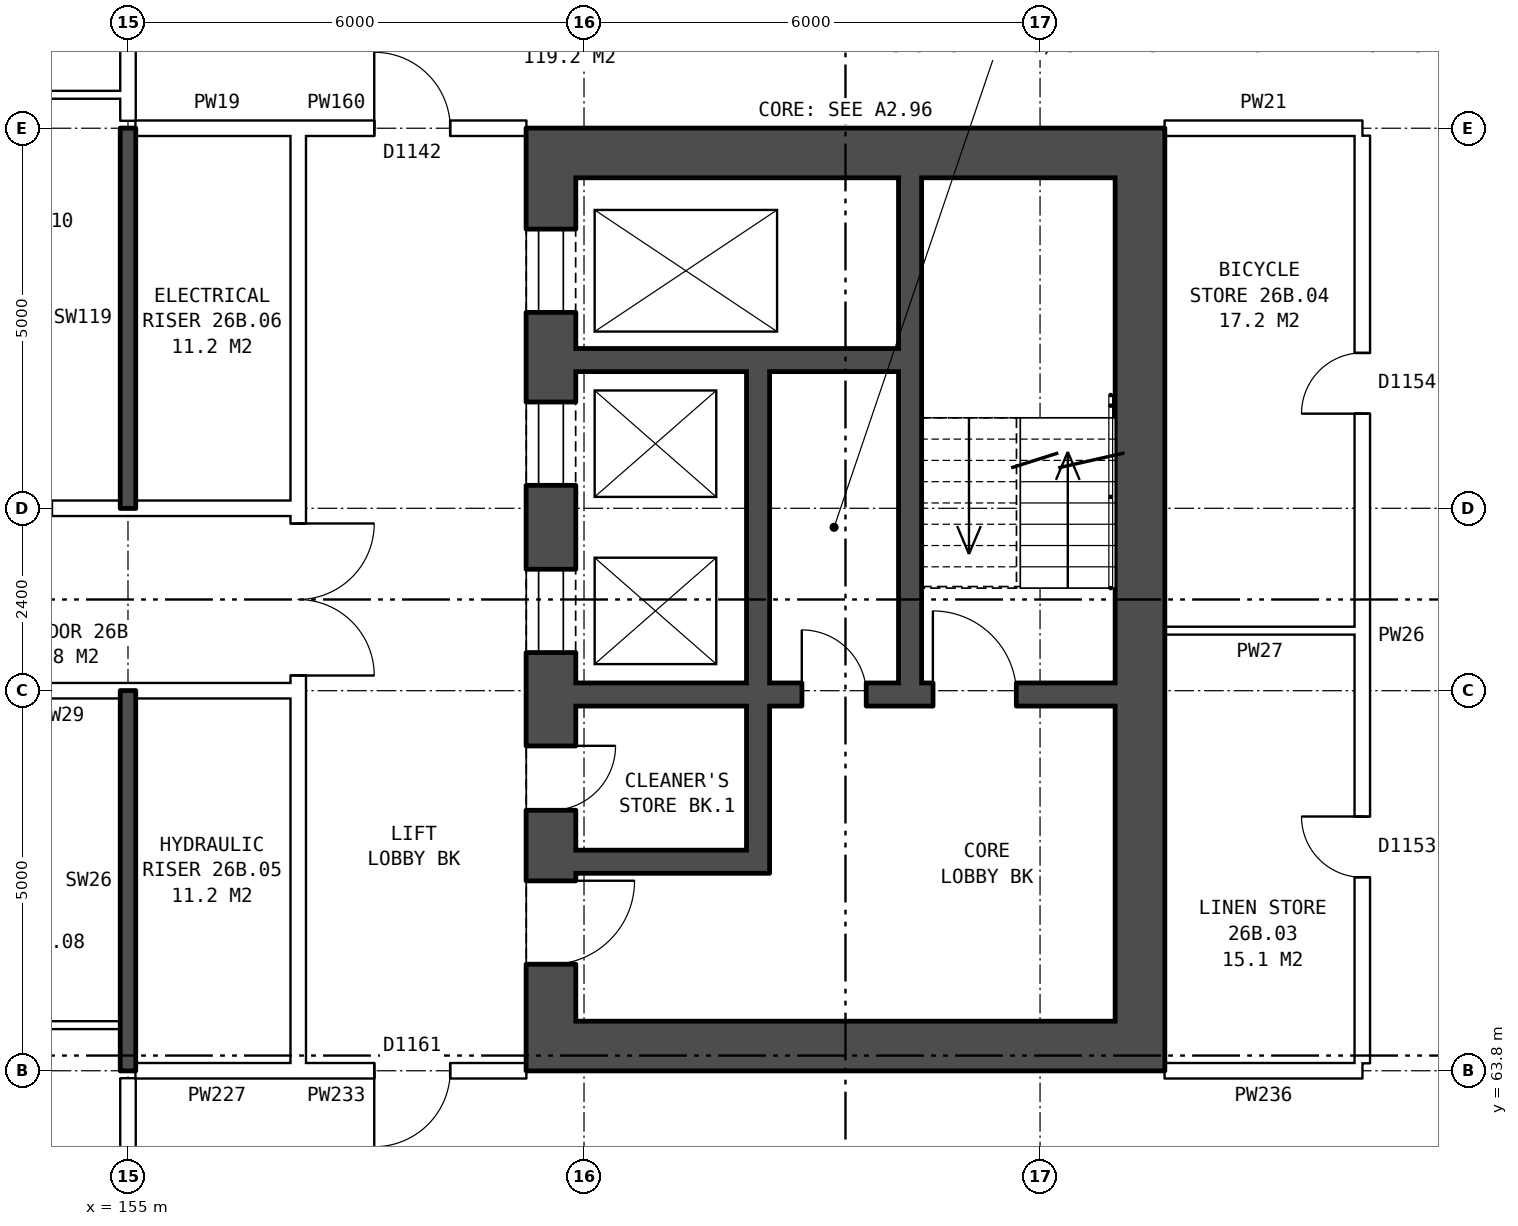
"""IFC4 building model, lengths in metres.
Left out: names, types, materials, properties, quantities, classifications, styles, units other than length and angle.
Written with IfcOpenShell. Run it as: python <this file> out.ifc"""

import sys

from ifc_helpers import new_model, si_unit, direction, frame, frame_2d, origin, place, context, subcontext, project, spatial, rectangle, extrude, element, fill, save


model = new_model("IFC4")
c1 = context("Model", 3, precision=1e-05, world=origin(), true_north=direction((0.0, 1.0)))
c2 = subcontext(c1, "Body", "Model", "MODEL_VIEW")
j1 = project(units=[si_unit("LENGTHUNIT", "METRE"), si_unit("PLANEANGLEUNIT", "RADIAN")], contexts=[c1])
p1 = place(None, origin())
s1 = spatial("IfcSite", under=j1, at=p1, CompositionType="ELEMENT")
p2 = place(p1, origin())
s2 = spatial("IfcBuilding", under=s1, at=p2, CompositionType="ELEMENT")
p3 = place(p2, frame((0.0, 0.0, 96.4)))
s3 = spatial("IfcBuildingStorey", under=s2, at=p3, CompositionType="ELEMENT", Elevation=96.4)
p4 = place(p3, frame((160.565, 75.55, 0.0), z_axis=(0.0, 0.0, 1.0), x_axis=(0.0, -1.0, 0.0)))
e1 = element("IfcWall", 1, at=p4, inside=s3, PredefinedType="SHEAR", context=c2, shape_type="SweptSolid", body=[
    extrude(rectangle(XDim=11.1, YDim=0.65, at=frame_2d((5.55, 0.0))), origin(), (0.0, 0.0, 1.0), 2.85),
])
p5 = place(p4, frame((0.675, 0.0, 0.0)))
e2 = element("IfcOpeningElement", 2, at=p5, cuts=e1, PredefinedType="OPENING", context=c2, shape_type="SweptSolid", body=[
    extrude(rectangle(XDim=1.1, YDim=2.1, at=frame_2d((0.55, 1.05))), frame((0.0, 0.335, 0.0), z_axis=(0.0, -1.0, 0.0), x_axis=(1.0, 0.0, 0.0)), (0.0, 0.0, 1.0), 0.67),
])
p6 = place(p4, frame((2.95, 0.0, 0.0)))
e3 = element("IfcOpeningElement", 3, at=p6, cuts=e1, PredefinedType="OPENING", context=c2, shape_type="SweptSolid", body=[
    extrude(rectangle(XDim=1.1, YDim=2.1, at=frame_2d((0.55, 1.05))), frame((0.0, 0.335, 0.0), z_axis=(0.0, -1.0, 0.0), x_axis=(1.0, 0.0, 0.0)), (0.0, 0.0, 1.0), 0.67),
])
p7 = place(p4, frame((5.15, 0.0, 0.0)))
e4 = element("IfcOpeningElement", 4, at=p7, cuts=e1, PredefinedType="OPENING", context=c2, shape_type="SweptSolid", body=[
    extrude(rectangle(XDim=1.1, YDim=2.1, at=frame_2d((0.55, 1.05))), frame((0.0, 0.335, 0.0), z_axis=(0.0, -1.0, 0.0), x_axis=(1.0, 0.0, 0.0)), (0.0, 0.0, 1.0), 0.67),
])
p8 = place(p4, frame((9.25, 0.0, 0.0)))
e5 = element("IfcOpeningElement", 5, at=p8, cuts=e1, PredefinedType="OPENING", context=c2, shape_type="SweptSolid", body=[
    extrude(rectangle(XDim=1.1, YDim=2.1, at=frame_2d((0.55, 1.05))), frame((0.0, 0.335, 0.0), z_axis=(0.0, -1.0, 0.0), x_axis=(1.0, 0.0, 0.0)), (0.0, 0.0, 1.0), 0.67),
])
p9 = place(p4, frame((7.475, 0.0, 0.0)))
e6 = element("IfcOpeningElement", 6, at=p9, cuts=e1, PredefinedType="OPENING", context=c2, shape_type="SweptSolid", body=[
    extrude(rectangle(XDim=0.85, YDim=2.1, at=frame_2d((0.425, 1.05))), frame((0.0, 0.335, 0.0), z_axis=(0.0, -1.0, 0.0), x_axis=(1.0, 0.0, 0.0)), (0.0, 0.0, 1.0), 0.67),
])
p10 = place(p3, frame((168.315, 75.55, 0.0), z_axis=(0.0, 0.0, 1.0), x_axis=(0.0, -1.0, 0.0)))
e7 = element("IfcWall", 7, at=p10, inside=s3, PredefinedType="SHEAR", context=c2, shape_type="SweptSolid", body=[
    extrude(rectangle(XDim=11.1, YDim=0.65, at=frame_2d((5.55, 0.0))), origin(), (0.0, 0.0, 1.0), 2.85),
])
for number, where, z_axis, x_axis in (
    (8, (160.24, 75.875, 0.0), (0.0, 0.0, 1.0), (1.0, 0.0, 0.0)),
    (9, (160.24, 64.125, 0.0), (0.0, 0.0, 1.0), (1.0, 0.0, 0.0)),
):
    element("IfcWall", number, at=place(p3, frame(where, z_axis=z_axis, x_axis=x_axis)), inside=s3, PredefinedType="SHEAR", context=c2, shape_type="SweptSolid", body=[
        extrude(rectangle(XDim=8.4, YDim=0.65, at=frame_2d((4.2, 0.0))), origin(), (0.0, 0.0, 1.0), 2.85),
    ])
p11 = place(p3, frame((160.89, 73.15, 0.0), z_axis=(0.0, 0.0, 1.0), x_axis=(1.0, 0.0, 0.0)))
e10 = element("IfcWall", 10, at=p11, inside=s3, PredefinedType="SHEAR", context=c2, shape_type="SweptSolid", body=[
    extrude(rectangle(XDim=4.25, YDim=0.3, at=frame_2d((2.125, 0.0))), origin(), (0.0, 0.0, 1.0), 2.85),
])
p12 = place(p3, frame((160.89, 68.75, 0.0), z_axis=(0.0, 0.0, 1.0), x_axis=(1.0, 0.0, 0.0)))
e11 = element("IfcWall", 11, at=p12, inside=s3, PredefinedType="SHEAR", context=c2, shape_type="SweptSolid", body=[
    extrude(rectangle(XDim=7.1, YDim=0.3, at=frame_2d((3.55, 0.0))), origin(), (0.0, 0.0, 1.0), 2.85),
])
p13 = place(p12, frame((4.7, 0.0, 0.0)))
e12 = element("IfcOpeningElement", 12, at=p13, cuts=e11, PredefinedType="OPENING", context=c2, shape_type="SweptSolid", body=[
    extrude(rectangle(XDim=1.1, YDim=2.1, at=frame_2d((0.55, 1.05))), frame((0.0, 0.16, 0.0), z_axis=(0.0, -1.0, 0.0), x_axis=(1.0, 0.0, 0.0)), (0.0, 0.0, 1.0), 0.32),
])
p14 = place(p12, frame((2.975, 0.0, 0.0)))
e13 = element("IfcOpeningElement", 13, at=p14, cuts=e11, PredefinedType="OPENING", context=c2, shape_type="SweptSolid", body=[
    extrude(rectangle(XDim=0.85, YDim=2.1, at=frame_2d((0.425, 1.05))), frame((0.0, 0.16, 0.0), z_axis=(0.0, -1.0, 0.0), x_axis=(1.0, 0.0, 0.0)), (0.0, 0.0, 1.0), 0.32),
])
p15 = place(p3, frame((160.89, 66.55, 0.0), z_axis=(0.0, 0.0, 1.0), x_axis=(1.0, 0.0, 0.0)))
e14 = element("IfcWall", 14, at=p15, inside=s3, PredefinedType="SHEAR", context=c2, shape_type="SweptSolid", body=[
    extrude(rectangle(XDim=2.25, YDim=0.3, at=frame_2d((1.125, 0.0))), origin(), (0.0, 0.0, 1.0), 2.85),
])
p16 = place(p3, frame((163.29, 73.0, 0.0), z_axis=(0.0, 0.0, 1.0), x_axis=(0.0, -1.0, 0.0)))
e15 = element("IfcWall", 15, at=p16, inside=s3, PredefinedType="SHEAR", context=c2, shape_type="SweptSolid", body=[
    extrude(rectangle(XDim=4.1, YDim=0.3, at=frame_2d((2.05, 0.0))), origin(), (0.0, 0.0, 1.0), 2.85),
])
p17 = place(p3, frame((163.29, 68.6, 0.0), z_axis=(0.0, 0.0, 1.0), x_axis=(0.0, -1.0, 0.0)))
e16 = element("IfcWall", 16, at=p17, inside=s3, PredefinedType="SHEAR", context=c2, shape_type="SweptSolid", body=[
    extrude(rectangle(XDim=2.2, YDim=0.3, at=frame_2d((1.1, 0.0))), origin(), (0.0, 0.0, 1.0), 2.85),
])
p18 = place(p3, frame((165.29, 75.55, 0.0), z_axis=(0.0, 0.0, 1.0), x_axis=(0.0, -1.0, 0.0)))
e17 = element("IfcWall", 17, at=p18, inside=s3, PredefinedType="SHEAR", context=c2, shape_type="SweptSolid", body=[
    extrude(rectangle(XDim=6.65, YDim=0.3, at=frame_2d((3.325, 0.0))), origin(), (0.0, 0.0, 1.0), 2.85),
])
p19 = place(p3, frame((157.24, 63.9, 0.0), z_axis=(0.0, 0.0, 1.0), x_axis=(0.0, 1.0, 0.0)))
e18 = element("IfcWall", 18, at=p19, inside=s3, PredefinedType="PARTITIONING", context=c2, shape_type="SweptSolid", body=[
    extrude(rectangle(XDim=12.2, YDim=0.2, at=frame_2d((6.1, 0.0))), origin(), (0.0, 0.0, 1.0), 2.85),
])
p20 = place(p19, frame((5.1, 0.0, 0.0)))
e19 = element("IfcOpeningElement", 19, at=p20, cuts=e18, PredefinedType="OPENING", context=c2, shape_type="SweptSolid", body=[
    extrude(rectangle(XDim=2.0, YDim=2.1, at=frame_2d((1.0, 1.05))), frame((0.0, 0.11, 0.0), z_axis=(0.0, -1.0, 0.0), x_axis=(1.0, 0.0, 0.0)), (0.0, 0.0, 1.0), 0.22),
])
p21 = place(p3, frame((155.1, 63.8, 0.0), z_axis=(0.0, 0.0, 1.0), x_axis=(1.0, 0.0, 0.0)))
e20 = element("IfcWall", 20, at=p21, inside=s3, PredefinedType="PARTITIONING", context=c2, shape_type="SweptSolid", body=[
    extrude(rectangle(XDim=2.14, YDim=0.2, at=frame_2d((1.07, 0.0))), origin(), (0.0, 0.0, 1.0), 2.85),
])
p22 = place(p3, frame((157.24, 63.8, 0.0), z_axis=(0.0, 0.0, 1.0), x_axis=(1.0, 0.0, 0.0)))
e21 = element("IfcWall", 21, at=p22, inside=s3, PredefinedType="PARTITIONING", context=c2, shape_type="SweptSolid", body=[
    extrude(rectangle(XDim=3.0, YDim=0.2, at=frame_2d((1.5, 0.0))), origin(), (0.0, 0.0, 1.0), 2.85),
])
p23 = place(p22, frame((1.0, 0.0, 0.0)))
e22 = element("IfcOpeningElement", 22, at=p23, cuts=e21, PredefinedType="OPENING", context=c2, shape_type="SweptSolid", body=[
    extrude(rectangle(XDim=1.0, YDim=2.1, at=frame_2d((0.5, 1.05))), frame((0.0, 0.11, 0.0), z_axis=(0.0, -1.0, 0.0), x_axis=(1.0, 0.0, 0.0)), (0.0, 0.0, 1.0), 0.22),
])
p24 = place(p3, frame((168.64, 63.8, 0.0), z_axis=(0.0, 0.0, 1.0), x_axis=(1.0, 0.0, 0.0)))
e23 = element("IfcWall", 23, at=p24, inside=s3, PredefinedType="PARTITIONING", context=c2, shape_type="SweptSolid", body=[
    extrude(rectangle(XDim=2.6, YDim=0.2, at=frame_2d((1.3, 0.0))), origin(), (0.0, 0.0, 1.0), 2.85),
])
p25 = place(p3, frame((152.0, 64.4, 0.0), z_axis=(0.0, 0.0, 1.0), x_axis=(1.0, 0.0, 0.0)))
e24 = element("IfcWall", 24, at=p25, inside=s3, PredefinedType="PARTITIONING", context=c2, shape_type="SweptSolid", body=[
    extrude(rectangle(XDim=2.9, YDim=0.1, at=frame_2d((1.45, 0.0))), origin(), (0.0, 0.0, 1.0), 2.85),
])
p26 = place(p3, frame((142.76, 68.8, 0.0), z_axis=(0.0, 0.0, 1.0), x_axis=(1.0, 0.0, 0.0)))
e25 = element("IfcWall", 25, at=p26, inside=s3, PredefinedType="PARTITIONING", context=c2, shape_type="SweptSolid", body=[
    extrude(rectangle(XDim=14.48, YDim=0.2, at=frame_2d((7.24, 0.0))), origin(), (0.0, 0.0, 1.0), 2.85),
])
p27 = place(p26, frame((4.24, 0.0, 0.0)))
e26 = element("IfcOpeningElement", 26, at=p27, cuts=e25, PredefinedType="OPENING", context=c2, shape_type="SweptSolid", body=[
    extrude(rectangle(XDim=1.0, YDim=2.1, at=frame_2d((0.5, 1.05))), frame((0.0, 0.11, 0.0), z_axis=(0.0, -1.0, 0.0), x_axis=(1.0, 0.0, 0.0)), (0.0, 0.0, 1.0), 0.22),
])
p28 = place(p26, frame((7.24, 0.0, 0.0)))
e27 = element("IfcOpeningElement", 27, at=p28, cuts=e25, PredefinedType="OPENING", context=c2, shape_type="SweptSolid", body=[
    extrude(rectangle(XDim=1.0, YDim=2.1, at=frame_2d((0.5, 1.05))), frame((0.0, 0.11, 0.0), z_axis=(0.0, -1.0, 0.0), x_axis=(1.0, 0.0, 0.0)), (0.0, 0.0, 1.0), 0.22),
])
p29 = place(p3, frame((168.64, 69.59, 0.0), z_axis=(0.0, 0.0, 1.0), x_axis=(1.0, 0.0, 0.0)))
e28 = element("IfcWall", 28, at=p29, inside=s3, PredefinedType="PARTITIONING", context=c2, shape_type="SweptSolid", body=[
    extrude(rectangle(XDim=2.5, YDim=0.1, at=frame_2d((1.25, 0.0))), origin(), (0.0, 0.0, 1.0), 2.85),
])
p30 = place(p3, frame((142.76, 71.2, 0.0), z_axis=(0.0, 0.0, 1.0), x_axis=(1.0, 0.0, 0.0)))
e29 = element("IfcWall", 29, at=p30, inside=s3, PredefinedType="PARTITIONING", context=c2, shape_type="SweptSolid", body=[
    extrude(rectangle(XDim=14.48, YDim=0.2, at=frame_2d((7.24, 0.0))), origin(), (0.0, 0.0, 1.0), 2.85),
])
p31 = place(p30, frame((1.12, 0.0, 0.0)))
e30 = element("IfcOpeningElement", 30, at=p31, cuts=e29, PredefinedType="OPENING", context=c2, shape_type="SweptSolid", body=[
    extrude(rectangle(XDim=1.0, YDim=2.1, at=frame_2d((0.5, 1.05))), frame((0.0, 0.11, 0.0), z_axis=(0.0, -1.0, 0.0), x_axis=(1.0, 0.0, 0.0)), (0.0, 0.0, 1.0), 0.22),
])
p32 = place(p30, frame((10.24, 0.0, 0.0)))
e31 = element("IfcOpeningElement", 31, at=p32, cuts=e29, PredefinedType="OPENING", context=c2, shape_type="SweptSolid", body=[
    extrude(rectangle(XDim=1.0, YDim=2.1, at=frame_2d((0.5, 1.05))), frame((0.0, 0.11, 0.0), z_axis=(0.0, -1.0, 0.0), x_axis=(1.0, 0.0, 0.0)), (0.0, 0.0, 1.0), 0.22),
])
p33 = place(p3, frame((155.1, 76.2, 0.0), z_axis=(0.0, 0.0, 1.0), x_axis=(1.0, 0.0, 0.0)))
e32 = element("IfcWall", 32, at=p33, inside=s3, PredefinedType="PARTITIONING", context=c2, shape_type="SweptSolid", body=[
    extrude(rectangle(XDim=2.14, YDim=0.2, at=frame_2d((1.07, 0.0))), origin(), (0.0, 0.0, 1.0), 2.85),
])
p34 = place(p3, frame((157.24, 76.2, 0.0), z_axis=(0.0, 0.0, 1.0), x_axis=(1.0, 0.0, 0.0)))
e33 = element("IfcWall", 33, at=p34, inside=s3, PredefinedType="PARTITIONING", context=c2, shape_type="SweptSolid", body=[
    extrude(rectangle(XDim=3.0, YDim=0.2, at=frame_2d((1.5, 0.0))), origin(), (0.0, 0.0, 1.0), 2.85),
])
p35 = place(p34, frame((1.0, 0.0, 0.0)))
e34 = element("IfcOpeningElement", 34, at=p35, cuts=e33, PredefinedType="OPENING", context=c2, shape_type="SweptSolid", body=[
    extrude(rectangle(XDim=1.0, YDim=2.1, at=frame_2d((0.5, 1.05))), frame((0.0, 0.11, 0.0), z_axis=(0.0, -1.0, 0.0), x_axis=(1.0, 0.0, 0.0)), (0.0, 0.0, 1.0), 0.22),
])
p36 = place(p3, frame((168.64, 76.2, 0.0), z_axis=(0.0, 0.0, 1.0), x_axis=(1.0, 0.0, 0.0)))
e35 = element("IfcWall", 35, at=p36, inside=s3, PredefinedType="PARTITIONING", context=c2, shape_type="SweptSolid", body=[
    extrude(rectangle(XDim=2.6, YDim=0.2, at=frame_2d((1.3, 0.0))), origin(), (0.0, 0.0, 1.0), 2.85),
])
p37 = place(p3, frame((152.0, 76.64, 0.0), z_axis=(0.0, 0.0, 1.0), x_axis=(1.0, 0.0, 0.0)))
e36 = element("IfcWall", 36, at=p37, inside=s3, PredefinedType="PARTITIONING", context=c2, shape_type="SweptSolid", body=[
    extrude(rectangle(XDim=2.9, YDim=0.1, at=frame_2d((1.45, 0.0))), origin(), (0.0, 0.0, 1.0), 2.85),
])
p38 = place(p37, frame((1.0, 0.0, 0.0)))
e37 = element("IfcOpeningElement", 37, at=p38, cuts=e36, PredefinedType="OPENING", context=c2, shape_type="SweptSolid", body=[
    extrude(rectangle(XDim=0.9, YDim=2.1, at=frame_2d((0.45, 1.05))), frame((0.0, 0.06, 0.0), z_axis=(0.0, -1.0, 0.0), x_axis=(1.0, 0.0, 0.0)), (0.0, 0.0, 1.0), 0.12),
])
p39 = place(p3, frame((155.0, 61.5, 0.0), z_axis=(0.0, 0.0, 1.0), x_axis=(0.0, 1.0, 0.0)))
e38 = element("IfcWall", 38, at=p39, inside=s3, PredefinedType="PARTITIONING", context=c2, shape_type="SweptSolid", body=[
    extrude(rectangle(XDim=2.2, YDim=0.2, at=frame_2d((1.1, 0.0))), origin(), (0.0, 0.0, 1.0), 2.85),
])
for number, where, z_axis, x_axis in (
    (39, (155.0, 63.8, 0.0), (0.0, 0.0, 1.0), (0.0, 1.0, 0.0)),
    (40, (155.0, 71.2, 0.0), (0.0, 0.0, 1.0), (0.0, 1.0, 0.0)),
):
    element("IfcWall", number, at=place(p3, frame(where, z_axis=z_axis, x_axis=x_axis)), inside=s3, PredefinedType="SOLIDWALL", context=c2, shape_type="SweptSolid", body=[
        extrude(rectangle(XDim=5.0, YDim=0.2, at=frame_2d((2.5, 0.0))), origin(), (0.0, 0.0, 1.0), 2.85),
    ])
p40 = place(p3, frame((155.0, 76.3, 0.0), z_axis=(0.0, 0.0, 1.0), x_axis=(0.0, 1.0, 0.0)))
e41 = element("IfcWall", 41, at=p40, inside=s3, PredefinedType="PARTITIONING", context=c2, shape_type="SweptSolid", body=[
    extrude(rectangle(XDim=2.2, YDim=0.2, at=frame_2d((1.1, 0.0))), origin(), (0.0, 0.0, 1.0), 2.85),
])
p41 = place(p3, frame((171.24, 63.9, 0.0), z_axis=(0.0, 0.0, 1.0), x_axis=(0.0, 1.0, 0.0)))
e42 = element("IfcWall", 42, at=p41, inside=s3, PredefinedType="PARTITIONING", context=c2, shape_type="SweptSolid", body=[
    extrude(rectangle(XDim=12.2, YDim=0.2, at=frame_2d((6.1, 0.0))), origin(), (0.0, 0.0, 1.0), 2.85),
])
p42 = place(p41, frame((2.445, 0.0, 0.0)))
e43 = element("IfcOpeningElement", 43, at=p42, cuts=e42, PredefinedType="OPENING", context=c2, shape_type="SweptSolid", body=[
    extrude(rectangle(XDim=0.8, YDim=2.1, at=frame_2d((0.4, 1.05))), frame((0.0, 0.11, 0.0), z_axis=(0.0, -1.0, 0.0), x_axis=(1.0, 0.0, 0.0)), (0.0, 0.0, 1.0), 0.22),
])
p43 = place(p41, frame((8.545, 0.0, 0.0)))
e44 = element("IfcOpeningElement", 44, at=p43, cuts=e42, PredefinedType="OPENING", context=c2, shape_type="SweptSolid", body=[
    extrude(rectangle(XDim=0.8, YDim=2.1, at=frame_2d((0.4, 1.05))), frame((0.0, 0.11, 0.0), z_axis=(0.0, -1.0, 0.0), x_axis=(1.0, 0.0, 0.0)), (0.0, 0.0, 1.0), 0.22),
])
p44 = place(p5, origin())
e45 = element("IfcDoor", 45, at=p44, inside=s3, OperationType="DOUBLE_DOOR_SLIDING", PredefinedType="DOOR", context=c2, shape_type="SweptSolid", body=[
    extrude(rectangle(XDim=1.1, YDim=2.1, at=frame_2d((0.55, 1.05))), frame((0.0, 0.31, 0.0), z_axis=(0.0, -1.0, 0.0), x_axis=(1.0, 0.0, 0.0)), (0.0, 0.0, 1.0), 0.05),
])
fill(e2, e45)
p45 = place(p6, origin())
e46 = element("IfcDoor", 46, at=p45, inside=s3, OperationType="DOUBLE_DOOR_SLIDING", PredefinedType="DOOR", context=c2, shape_type="SweptSolid", body=[
    extrude(rectangle(XDim=1.1, YDim=2.1, at=frame_2d((0.55, 1.05))), frame((0.0, 0.31, 0.0), z_axis=(0.0, -1.0, 0.0), x_axis=(1.0, 0.0, 0.0)), (0.0, 0.0, 1.0), 0.05),
])
fill(e3, e46)
p46 = place(p7, origin())
e47 = element("IfcDoor", 47, at=p46, inside=s3, OperationType="DOUBLE_DOOR_SLIDING", PredefinedType="DOOR", context=c2, shape_type="SweptSolid", body=[
    extrude(rectangle(XDim=1.1, YDim=2.1, at=frame_2d((0.55, 1.05))), frame((0.0, 0.31, 0.0), z_axis=(0.0, -1.0, 0.0), x_axis=(1.0, 0.0, 0.0)), (0.0, 0.0, 1.0), 0.05),
])
fill(e4, e47)
p47 = place(p8, origin())
e48 = element("IfcDoor", 48, at=p47, inside=s3, OperationType="SINGLE_SWING_LEFT", PredefinedType="DOOR", context=c2, shape_type="SweptSolid", body=[
    extrude(rectangle(XDim=1.1, YDim=2.1, at=frame_2d((0.55, 1.05))), frame((0.0, 0.31, 0.0), z_axis=(0.0, -1.0, 0.0), x_axis=(1.0, 0.0, 0.0)), (0.0, 0.0, 1.0), 0.05),
])
fill(e5, e48)
p48 = place(p13, origin())
e49 = element("IfcDoor", 49, at=p48, inside=s3, OperationType="SINGLE_SWING_LEFT", PredefinedType="DOOR", context=c2, shape_type="SweptSolid", body=[
    extrude(rectangle(XDim=1.1, YDim=2.1, at=frame_2d((0.55, 1.05))), frame((0.0, 0.025, 0.0), z_axis=(0.0, -1.0, 0.0), x_axis=(1.0, 0.0, 0.0)), (0.0, 0.0, 1.0), 0.05),
])
fill(e12, e49)
p49 = place(p9, origin())
e50 = element("IfcDoor", 50, at=p49, inside=s3, OperationType="SINGLE_SWING_LEFT", PredefinedType="DOOR", context=c2, shape_type="SweptSolid", body=[
    extrude(rectangle(XDim=0.85, YDim=2.1, at=frame_2d((0.425, 1.05))), frame((0.0, 0.31, 0.0), z_axis=(0.0, -1.0, 0.0), x_axis=(1.0, 0.0, 0.0)), (0.0, 0.0, 1.0), 0.05),
])
fill(e6, e50)
p50 = place(p14, origin())
e51 = element("IfcDoor", 51, at=p50, inside=s3, OperationType="SINGLE_SWING_LEFT", PredefinedType="DOOR", context=c2, shape_type="SweptSolid", body=[
    extrude(rectangle(XDim=0.85, YDim=2.1, at=frame_2d((0.425, 1.05))), frame((0.0, 0.025, 0.0), z_axis=(0.0, -1.0, 0.0), x_axis=(1.0, 0.0, 0.0)), (0.0, 0.0, 1.0), 0.05),
])
fill(e13, e51)
p51 = place(p20, frame((2.0, 0.0, 0.0), z_axis=(0.0, 0.0, 1.0), x_axis=(-1.0, 0.0, 0.0)))
e52 = element("IfcDoor", 52, at=p51, inside=s3, OperationType="DOUBLE_DOOR_SINGLE_SWING", PredefinedType="DOOR", context=c2, shape_type="SweptSolid", body=[
    extrude(rectangle(XDim=2.0, YDim=2.1, at=frame_2d((1.0, 1.05))), frame((0.0, 0.025, 0.0), z_axis=(0.0, -1.0, 0.0), x_axis=(1.0, 0.0, 0.0)), (0.0, 0.0, 1.0), 0.05),
])
fill(e19, e52)
p52 = place(p23, frame((1.0, 0.0, 0.0), z_axis=(0.0, 0.0, 1.0), x_axis=(-1.0, 0.0, 0.0)))
e53 = element("IfcDoor", 53, at=p52, inside=s3, OperationType="SINGLE_SWING_RIGHT", PredefinedType="DOOR", context=c2, shape_type="SweptSolid", body=[
    extrude(rectangle(XDim=1.0, YDim=2.1, at=frame_2d((0.5, 1.05))), frame((0.0, 0.025, 0.0), z_axis=(0.0, -1.0, 0.0), x_axis=(1.0, 0.0, 0.0)), (0.0, 0.0, 1.0), 0.05),
])
fill(e22, e53)
p53 = place(p35, origin())
e54 = element("IfcDoor", 54, at=p53, inside=s3, OperationType="SINGLE_SWING_LEFT", PredefinedType="DOOR", context=c2, shape_type="SweptSolid", body=[
    extrude(rectangle(XDim=1.0, YDim=2.1, at=frame_2d((0.5, 1.05))), frame((0.0, 0.025, 0.0), z_axis=(0.0, -1.0, 0.0), x_axis=(1.0, 0.0, 0.0)), (0.0, 0.0, 1.0), 0.05),
])
fill(e34, e54)
p54 = place(p42, origin())
e55 = element("IfcDoor", 55, at=p54, inside=s3, OperationType="SINGLE_SWING_RIGHT", PredefinedType="DOOR", context=c2, shape_type="SweptSolid", body=[
    extrude(rectangle(XDim=0.8, YDim=2.1, at=frame_2d((0.4, 1.05))), frame((0.0, 0.025, 0.0), z_axis=(0.0, -1.0, 0.0), x_axis=(1.0, 0.0, 0.0)), (0.0, 0.0, 1.0), 0.05),
])
fill(e43, e55)
p55 = place(p43, origin())
e56 = element("IfcDoor", 56, at=p55, inside=s3, OperationType="SINGLE_SWING_LEFT", PredefinedType="DOOR", context=c2, shape_type="SweptSolid", body=[
    extrude(rectangle(XDim=0.8, YDim=2.1, at=frame_2d((0.4, 1.05))), frame((0.0, 0.025, 0.0), z_axis=(0.0, -1.0, 0.0), x_axis=(1.0, 0.0, 0.0)), (0.0, 0.0, 1.0), 0.05),
])
fill(e44, e56)
save(model, sys.argv[1])
